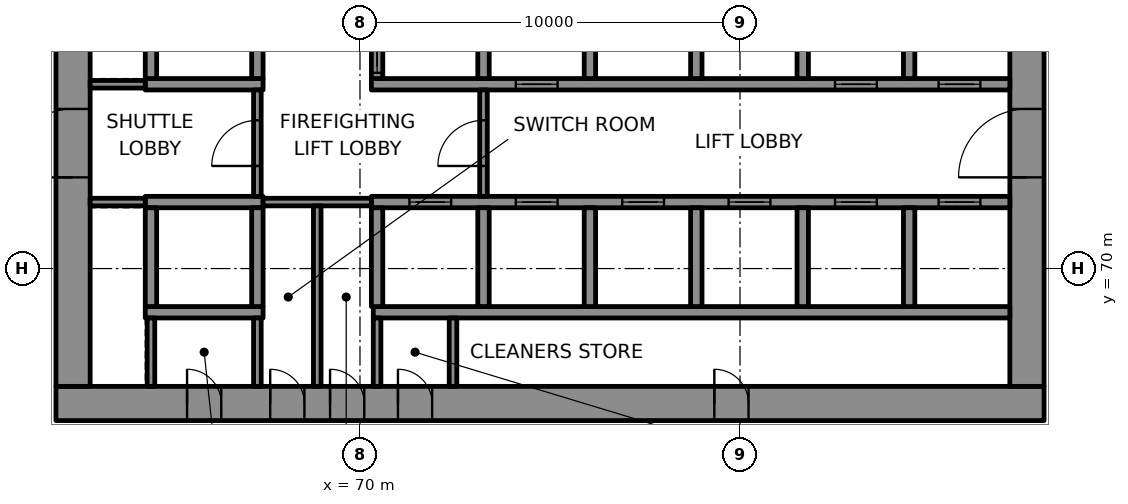
"""IFC4 building model, lengths in metres.
Left out: names, types, materials, properties, quantities, classifications, styles, units other than length and angle.
Written with IfcOpenShell. Run it as: python <this file> out.ifc"""

import sys

from ifc_helpers import new_model, si_unit, direction, frame, frame_2d, origin, place, context, subcontext, project, spatial, rectangle, extrude, element, fill, save


model = new_model("IFC4")
c1 = context("Model", 3, precision=1e-05, world=origin(), true_north=direction((0.0, 1.0)))
c2 = subcontext(c1, "Body", "Model", "MODEL_VIEW")
j1 = project(units=[si_unit("LENGTHUNIT", "METRE"), si_unit("PLANEANGLEUNIT", "RADIAN")], contexts=[c1])
p1 = place(None, origin())
s1 = spatial("IfcSite", under=j1, at=p1, CompositionType="ELEMENT")
p2 = place(p1, origin())
s2 = spatial("IfcBuilding", under=s1, at=p2, CompositionType="ELEMENT")
p3 = place(p2, frame((0.0, 0.0, 77.8)))
s3 = spatial("IfcBuildingStorey", under=s2, at=p3, CompositionType="ELEMENT", Elevation=77.8)
p4 = place(p3, frame((62.0, 66.45, 0.0), z_axis=(0.0, 0.0, 1.0), x_axis=(1.0, 0.0, 0.0)))
e1 = element("IfcWall", 1, at=p4, inside=s3, PredefinedType="SHEAR", context=c2, shape_type="SweptSolid", body=[
    extrude(rectangle(XDim=26.0, YDim=0.9, at=frame_2d((13.0, 0.0))), origin(), (0.0, 0.0, 1.0), 4.0),
])
p5 = place(p4, frame((3.45, 0.0, 0.0)))
e2 = element("IfcOpeningElement", 2, at=p5, cuts=e1, PredefinedType="OPENING", context=c2, shape_type="SweptSolid", body=[
    extrude(rectangle(XDim=0.9, YDim=2.1, at=frame_2d((0.45, 1.05))), frame((0.0, 0.46, 0.0), z_axis=(0.0, -1.0, 0.0), x_axis=(1.0, 0.0, 0.0)), (0.0, 0.0, 1.0), 0.92),
])
p6 = place(p4, frame((5.637, 0.0, 0.0)))
e3 = element("IfcOpeningElement", 3, at=p6, cuts=e1, PredefinedType="OPENING", context=c2, shape_type="SweptSolid", body=[
    extrude(rectangle(XDim=0.9, YDim=2.1, at=frame_2d((0.45, 1.05))), frame((0.0, 0.46, 0.0), z_axis=(0.0, -1.0, 0.0), x_axis=(1.0, 0.0, 0.0)), (0.0, 0.0, 1.0), 0.92),
])
p7 = place(p4, frame((7.212, 0.0, 0.0)))
e4 = element("IfcOpeningElement", 4, at=p7, cuts=e1, PredefinedType="OPENING", context=c2, shape_type="SweptSolid", body=[
    extrude(rectangle(XDim=0.9, YDim=2.1, at=frame_2d((0.45, 1.05))), frame((0.0, 0.46, 0.0), z_axis=(0.0, -1.0, 0.0), x_axis=(1.0, 0.0, 0.0)), (0.0, 0.0, 1.0), 0.92),
])
p8 = place(p4, frame((8.999, 0.0, 0.0)))
e5 = element("IfcOpeningElement", 5, at=p8, cuts=e1, PredefinedType="OPENING", context=c2, shape_type="SweptSolid", body=[
    extrude(rectangle(XDim=0.9, YDim=2.1, at=frame_2d((0.45, 1.05))), frame((0.0, 0.46, 0.0), z_axis=(0.0, -1.0, 0.0), x_axis=(1.0, 0.0, 0.0)), (0.0, 0.0, 1.0), 0.92),
])
p9 = place(p4, frame((17.324, 0.0, 0.0)))
e6 = element("IfcOpeningElement", 6, at=p9, cuts=e1, PredefinedType="OPENING", context=c2, shape_type="SweptSolid", body=[
    extrude(rectangle(XDim=0.9, YDim=2.1, at=frame_2d((0.45, 1.05))), frame((0.0, 0.46, 0.0), z_axis=(0.0, -1.0, 0.0), x_axis=(1.0, 0.0, 0.0)), (0.0, 0.0, 1.0), 0.92),
])
p10 = place(p3, frame((62.45, 66.9, 0.0), z_axis=(0.0, 0.0, 1.0), x_axis=(0.0, 1.0, 0.0)))
e7 = element("IfcWall", 7, at=p10, inside=s3, PredefinedType="SHEAR", context=c2, shape_type="SweptSolid", body=[
    extrude(rectangle(XDim=16.2, YDim=0.9, at=frame_2d((8.1, 0.0))), origin(), (0.0, 0.0, 1.0), 4.0),
])
p11 = place(p10, frame((5.5, 0.0, 0.0)))
e8 = element("IfcOpeningElement", 8, at=p11, cuts=e7, PredefinedType="OPENING", context=c2, shape_type="SweptSolid", body=[
    extrude(rectangle(XDim=1.8, YDim=2.1, at=frame_2d((0.9, 1.05))), frame((0.0, 0.46, 0.0), z_axis=(0.0, -1.0, 0.0), x_axis=(1.0, 0.0, 0.0)), (0.0, 0.0, 1.0), 0.92),
])
p12 = place(p3, frame((87.55, 66.9, 0.0), z_axis=(0.0, 0.0, 1.0), x_axis=(0.0, 1.0, 0.0)))
e9 = element("IfcWall", 9, at=p12, inside=s3, PredefinedType="SHEAR", context=c2, shape_type="SweptSolid", body=[
    extrude(rectangle(XDim=16.2, YDim=0.9, at=frame_2d((8.1, 0.0))), origin(), (0.0, 0.0, 1.0), 4.0),
])
p13 = place(p12, frame((5.5, 0.0, 0.0)))
e10 = element("IfcOpeningElement", 10, at=p13, cuts=e9, PredefinedType="OPENING", context=c2, shape_type="SweptSolid", body=[
    extrude(rectangle(XDim=1.8, YDim=2.1, at=frame_2d((0.9, 1.05))), frame((0.0, 0.46, 0.0), z_axis=(0.0, -1.0, 0.0), x_axis=(1.0, 0.0, 0.0)), (0.0, 0.0, 1.0), 0.92),
])
p14 = place(p12, frame((11.202, 0.0, 0.0)))
e11 = element("IfcOpeningElement", 11, at=p14, cuts=e9, PredefinedType="OPENING", context=c2, shape_type="SweptSolid", body=[
    extrude(rectangle(XDim=0.9, YDim=2.1, at=frame_2d((0.45, 1.05))), frame((0.0, 0.46, 0.0), z_axis=(0.0, -1.0, 0.0), x_axis=(1.0, 0.0, 0.0)), (0.0, 0.0, 1.0), 0.92),
])
p15 = place(p3, frame((64.35, 68.85, 0.0), z_axis=(0.0, 0.0, 1.0), x_axis=(1.0, 0.0, 0.0)))
e12 = element("IfcWall", 12, at=p15, inside=s3, PredefinedType="SHEAR", context=c2, shape_type="SweptSolid", body=[
    extrude(rectangle(XDim=3.1, YDim=0.3, at=frame_2d((1.55, 0.0))), origin(), (0.0, 0.0, 1.0), 4.0),
])
p16 = place(p3, frame((70.35, 68.85, 0.0), z_axis=(0.0, 0.0, 1.0), x_axis=(1.0, 0.0, 0.0)))
e13 = element("IfcWall", 13, at=p16, inside=s3, PredefinedType="SHEAR", context=c2, shape_type="SweptSolid", body=[
    extrude(rectangle(XDim=16.75, YDim=0.3, at=frame_2d((8.375, 0.0))), origin(), (0.0, 0.0, 1.0), 4.0),
])
p17 = place(p3, frame((64.35, 71.75, 0.0), z_axis=(0.0, 0.0, 1.0), x_axis=(1.0, 0.0, 0.0)))
e14 = element("IfcWall", 14, at=p17, inside=s3, PredefinedType="SHEAR", context=c2, shape_type="SweptSolid", body=[
    extrude(rectangle(XDim=3.1, YDim=0.3, at=frame_2d((1.55, 0.0))), origin(), (0.0, 0.0, 1.0), 4.0),
])
p18 = place(p3, frame((70.3, 71.75, 0.0), z_axis=(0.0, 0.0, 1.0), x_axis=(1.0, 0.0, 0.0)))
e15 = element("IfcWall", 15, at=p18, inside=s3, PredefinedType="SHEAR", context=c2, shape_type="SweptSolid", body=[
    extrude(rectangle(XDim=16.8, YDim=0.3, at=frame_2d((8.4, 0.0))), origin(), (0.0, 0.0, 1.0), 4.0),
])
p19 = place(p18, frame((1.0, 0.0, 0.0)))
e16 = element("IfcOpeningElement", 16, at=p19, cuts=e15, PredefinedType="OPENING", context=c2, shape_type="SweptSolid", body=[
    extrude(rectangle(XDim=1.1, YDim=2.1, at=frame_2d((0.55, 1.05))), frame((0.0, 0.16, 0.0), z_axis=(0.0, -1.0, 0.0), x_axis=(1.0, 0.0, 0.0)), (0.0, 0.0, 1.0), 0.32),
])
p20 = place(p18, frame((3.8, 0.0, 0.0)))
e17 = element("IfcOpeningElement", 17, at=p20, cuts=e15, PredefinedType="OPENING", context=c2, shape_type="SweptSolid", body=[
    extrude(rectangle(XDim=1.1, YDim=2.1, at=frame_2d((0.55, 1.05))), frame((0.0, 0.16, 0.0), z_axis=(0.0, -1.0, 0.0), x_axis=(1.0, 0.0, 0.0)), (0.0, 0.0, 1.0), 0.32),
])
p21 = place(p18, frame((6.6, 0.0, 0.0)))
e18 = element("IfcOpeningElement", 18, at=p21, cuts=e15, PredefinedType="OPENING", context=c2, shape_type="SweptSolid", body=[
    extrude(rectangle(XDim=1.1, YDim=2.1, at=frame_2d((0.55, 1.05))), frame((0.0, 0.16, 0.0), z_axis=(0.0, -1.0, 0.0), x_axis=(1.0, 0.0, 0.0)), (0.0, 0.0, 1.0), 0.32),
])
p22 = place(p18, frame((9.4, 0.0, 0.0)))
e19 = element("IfcOpeningElement", 19, at=p22, cuts=e15, PredefinedType="OPENING", context=c2, shape_type="SweptSolid", body=[
    extrude(rectangle(XDim=1.1, YDim=2.1, at=frame_2d((0.55, 1.05))), frame((0.0, 0.16, 0.0), z_axis=(0.0, -1.0, 0.0), x_axis=(1.0, 0.0, 0.0)), (0.0, 0.0, 1.0), 0.32),
])
p23 = place(p18, frame((12.2, 0.0, 0.0)))
e20 = element("IfcOpeningElement", 20, at=p23, cuts=e15, PredefinedType="OPENING", context=c2, shape_type="SweptSolid", body=[
    extrude(rectangle(XDim=1.1, YDim=2.1, at=frame_2d((0.55, 1.05))), frame((0.0, 0.16, 0.0), z_axis=(0.0, -1.0, 0.0), x_axis=(1.0, 0.0, 0.0)), (0.0, 0.0, 1.0), 0.32),
])
p24 = place(p18, frame((14.925, 0.0, 0.0)))
e21 = element("IfcOpeningElement", 21, at=p24, cuts=e15, PredefinedType="OPENING", context=c2, shape_type="SweptSolid", body=[
    extrude(rectangle(XDim=1.1, YDim=2.1, at=frame_2d((0.55, 1.05))), frame((0.0, 0.16, 0.0), z_axis=(0.0, -1.0, 0.0), x_axis=(1.0, 0.0, 0.0)), (0.0, 0.0, 1.0), 0.32),
])
p25 = place(p3, frame((64.35, 74.85, 0.0), z_axis=(0.0, 0.0, 1.0), x_axis=(1.0, 0.0, 0.0)))
e22 = element("IfcWall", 22, at=p25, inside=s3, PredefinedType="SHEAR", context=c2, shape_type="SweptSolid", body=[
    extrude(rectangle(XDim=3.1, YDim=0.3, at=frame_2d((1.55, 0.0))), origin(), (0.0, 0.0, 1.0), 4.0),
])
p26 = place(p3, frame((70.3, 74.85, 0.0), z_axis=(0.0, 0.0, 1.0), x_axis=(1.0, 0.0, 0.0)))
e23 = element("IfcWall", 23, at=p26, inside=s3, PredefinedType="SHEAR", context=c2, shape_type="SweptSolid", body=[
    extrude(rectangle(XDim=16.8, YDim=0.3, at=frame_2d((8.4, 0.0))), origin(), (0.0, 0.0, 1.0), 4.0),
])
p27 = place(p26, frame((3.8, 0.0, 0.0)))
e24 = element("IfcOpeningElement", 24, at=p27, cuts=e23, PredefinedType="OPENING", context=c2, shape_type="SweptSolid", body=[
    extrude(rectangle(XDim=1.1, YDim=2.1, at=frame_2d((0.55, 1.05))), frame((0.0, 0.16, 0.0), z_axis=(0.0, -1.0, 0.0), x_axis=(1.0, 0.0, 0.0)), (0.0, 0.0, 1.0), 0.32),
])
p28 = place(p26, frame((12.2, 0.0, 0.0)))
e25 = element("IfcOpeningElement", 25, at=p28, cuts=e23, PredefinedType="OPENING", context=c2, shape_type="SweptSolid", body=[
    extrude(rectangle(XDim=1.1, YDim=2.1, at=frame_2d((0.55, 1.05))), frame((0.0, 0.16, 0.0), z_axis=(0.0, -1.0, 0.0), x_axis=(1.0, 0.0, 0.0)), (0.0, 0.0, 1.0), 0.32),
])
p29 = place(p26, frame((14.925, 0.0, 0.0)))
e26 = element("IfcOpeningElement", 26, at=p29, cuts=e23, PredefinedType="OPENING", context=c2, shape_type="SweptSolid", body=[
    extrude(rectangle(XDim=1.1, YDim=2.1, at=frame_2d((0.55, 1.05))), frame((0.0, 0.16, 0.0), z_axis=(0.0, -1.0, 0.0), x_axis=(1.0, 0.0, 0.0)), (0.0, 0.0, 1.0), 0.32),
])
for number, where, z_axis, x_axis in (
    (27, (64.5, 69.0, 0.0), (0.0, 0.0, 1.0), (0.0, 1.0, 0.0)),
    (28, (64.5, 75.0, 0.0), (0.0, 0.0, 1.0), (0.0, 1.0, 0.0)),
    (29, (67.3, 69.0, 0.0), (0.0, 0.0, 1.0), (0.0, 1.0, 0.0)),
    (30, (67.3, 75.0, 0.0), (0.0, 0.0, 1.0), (0.0, 1.0, 0.0)),
    (31, (70.45, 69.0, 0.0), (0.0, 0.0, 1.0), (0.0, 1.0, 0.0)),
):
    element("IfcWall", number, at=place(p3, frame(where, z_axis=z_axis, x_axis=x_axis)), inside=s3, PredefinedType="SHEAR", context=c2, shape_type="SweptSolid", body=[
        extrude(rectangle(XDim=2.6, YDim=0.3, at=frame_2d((1.3, 0.0))), origin(), (0.0, 0.0, 1.0), 4.0),
    ])
p30 = place(p3, frame((70.45, 75.0, 0.0), z_axis=(0.0, 0.0, 1.0), x_axis=(0.0, 1.0, 0.0)))
e32 = element("IfcWall", 32, at=p30, inside=s3, PredefinedType="SHEAR", context=c2, shape_type="SweptSolid", body=[
    extrude(rectangle(XDim=2.6, YDim=0.3, at=frame_2d((1.3, 0.0))), origin(), (0.0, 0.0, 1.0), 4.0),
])
p31 = place(p30, frame((0.15, 0.0, 0.0)))
e33 = element("IfcOpeningElement", 33, at=p31, cuts=e32, PredefinedType="OPENING", context=c2, shape_type="SweptSolid", body=[
    extrude(rectangle(XDim=1.1, YDim=2.1, at=frame_2d((0.55, 1.05))), frame((0.0, 0.16, 0.0), z_axis=(0.0, -1.0, 0.0), x_axis=(1.0, 0.0, 0.0)), (0.0, 0.0, 1.0), 0.32),
])
for number, where, z_axis, x_axis in (
    (34, (73.25, 69.0, 0.0), (0.0, 0.0, 1.0), (0.0, 1.0, 0.0)),
    (35, (73.25, 75.0, 0.0), (0.0, 0.0, 1.0), (0.0, 1.0, 0.0)),
    (36, (76.05, 69.0, 0.0), (0.0, 0.0, 1.0), (0.0, 1.0, 0.0)),
    (37, (76.05, 75.0, 0.0), (0.0, 0.0, 1.0), (0.0, 1.0, 0.0)),
    (38, (78.85, 69.0, 0.0), (0.0, 0.0, 1.0), (0.0, 1.0, 0.0)),
    (39, (78.85, 75.0, 0.0), (0.0, 0.0, 1.0), (0.0, 1.0, 0.0)),
    (40, (81.65, 69.0, 0.0), (0.0, 0.0, 1.0), (0.0, 1.0, 0.0)),
    (41, (81.65, 75.0, 0.0), (0.0, 0.0, 1.0), (0.0, 1.0, 0.0)),
    (42, (84.45, 69.0, 0.0), (0.0, 0.0, 1.0), (0.0, 1.0, 0.0)),
    (43, (84.45, 75.0, 0.0), (0.0, 0.0, 1.0), (0.0, 1.0, 0.0)),
):
    element("IfcWall", number, at=place(p3, frame(where, z_axis=z_axis, x_axis=x_axis)), inside=s3, PredefinedType="SHEAR", context=c2, shape_type="SweptSolid", body=[
        extrude(rectangle(XDim=2.6, YDim=0.3, at=frame_2d((1.3, 0.0))), origin(), (0.0, 0.0, 1.0), 4.0),
    ])
p32 = place(p3, frame((62.9, 71.75, 0.0), z_axis=(0.0, 0.0, 1.0), x_axis=(1.0, 0.0, 0.0)))
e44 = element("IfcWall", 44, at=p32, inside=s3, PredefinedType="PARTITIONING", context=c2, shape_type="SweptSolid", body=[
    extrude(rectangle(XDim=1.45, YDim=0.2, at=frame_2d((0.725, 0.0))), origin(), (0.0, 0.0, 1.0), 4.0),
])
p33 = place(p3, frame((67.45, 71.75, 0.0), z_axis=(0.0, 0.0, 1.0), x_axis=(1.0, 0.0, 0.0)))
e45 = element("IfcWall", 45, at=p33, inside=s3, PredefinedType="PARTITIONING", context=c2, shape_type="SweptSolid", body=[
    extrude(rectangle(XDim=2.85, YDim=0.2, at=frame_2d((1.425, 0.0))), origin(), (0.0, 0.0, 1.0), 4.0),
])
p34 = place(p3, frame((62.9, 74.85, 0.0), z_axis=(0.0, 0.0, 1.0), x_axis=(1.0, 0.0, 0.0)))
e46 = element("IfcWall", 46, at=p34, inside=s3, PredefinedType="PARTITIONING", context=c2, shape_type="SweptSolid", body=[
    extrude(rectangle(XDim=1.45, YDim=0.2, at=frame_2d((0.725, 0.0))), origin(), (0.0, 0.0, 1.0), 4.0),
])
for number, where, z_axis, x_axis in (
    (47, (64.5, 66.9, 0.0), (0.0, 0.0, 1.0), (0.0, 1.0, 0.0)),
    (48, (67.3, 66.9, 0.0), (0.0, 0.0, 1.0), (0.0, 1.0, 0.0)),
):
    element("IfcWall", number, at=place(p3, frame(where, z_axis=z_axis, x_axis=x_axis)), inside=s3, PredefinedType="PARTITIONING", context=c2, shape_type="SweptSolid", body=[
        extrude(rectangle(XDim=1.8, YDim=0.2, at=frame_2d((0.9, 0.0))), origin(), (0.0, 0.0, 1.0), 4.0),
    ])
p35 = place(p3, frame((67.3, 71.9, 0.0), z_axis=(0.0, 0.0, 1.0), x_axis=(0.0, 1.0, 0.0)))
e49 = element("IfcWall", 49, at=p35, inside=s3, PredefinedType="PARTITIONING", context=c2, shape_type="SweptSolid", body=[
    extrude(rectangle(XDim=2.8, YDim=0.2, at=frame_2d((1.4, 0.0))), origin(), (0.0, 0.0, 1.0), 4.0),
])
p36 = place(p35, frame((0.8, 0.0, 0.0)))
e50 = element("IfcOpeningElement", 50, at=p36, cuts=e49, PredefinedType="OPENING", context=c2, shape_type="SweptSolid", body=[
    extrude(rectangle(XDim=1.2, YDim=2.1, at=frame_2d((0.6, 1.05))), frame((0.0, 0.11, 0.0), z_axis=(0.0, -1.0, 0.0), x_axis=(1.0, 0.0, 0.0)), (0.0, 0.0, 1.0), 0.22),
])
p37 = place(p3, frame((68.875, 66.9, 0.0), z_axis=(0.0, 0.0, 1.0), x_axis=(0.0, 1.0, 0.0)))
e51 = element("IfcWall", 51, at=p37, inside=s3, PredefinedType="PARTITIONING", context=c2, shape_type="SweptSolid", body=[
    extrude(rectangle(XDim=4.75, YDim=0.2, at=frame_2d((2.375, 0.0))), origin(), (0.0, 0.0, 1.0), 4.0),
])
for number, where, z_axis, x_axis in (
    (52, (70.45, 66.9, 0.0), (0.0, 0.0, 1.0), (0.0, 1.0, 0.0)),
    (53, (72.448, 66.9, 0.0), (0.0, 0.0, 1.0), (0.0, 1.0, 0.0)),
):
    element("IfcWall", number, at=place(p3, frame(where, z_axis=z_axis, x_axis=x_axis)), inside=s3, PredefinedType="PARTITIONING", context=c2, shape_type="SweptSolid", body=[
        extrude(rectangle(XDim=1.8, YDim=0.2, at=frame_2d((0.9, 0.0))), origin(), (0.0, 0.0, 1.0), 4.0),
    ])
p38 = place(p3, frame((73.25, 71.9, 0.0), z_axis=(0.0, 0.0, 1.0), x_axis=(0.0, 1.0, 0.0)))
e54 = element("IfcWall", 54, at=p38, inside=s3, PredefinedType="PARTITIONING", context=c2, shape_type="SweptSolid", body=[
    extrude(rectangle(XDim=2.8, YDim=0.2, at=frame_2d((1.4, 0.0))), origin(), (0.0, 0.0, 1.0), 4.0),
])
p39 = place(p38, frame((0.8, 0.0, 0.0)))
e55 = element("IfcOpeningElement", 55, at=p39, cuts=e54, PredefinedType="OPENING", context=c2, shape_type="SweptSolid", body=[
    extrude(rectangle(XDim=1.2, YDim=2.1, at=frame_2d((0.6, 1.05))), frame((0.0, 0.11, 0.0), z_axis=(0.0, -1.0, 0.0), x_axis=(1.0, 0.0, 0.0)), (0.0, 0.0, 1.0), 0.22),
])
p40 = place(p19, origin())
e56 = element("IfcDoor", 56, at=p40, inside=s3, OperationType="DOUBLE_DOOR_SLIDING", PredefinedType="DOOR", context=c2, shape_type="SweptSolid", body=[
    extrude(rectangle(XDim=1.1, YDim=2.1, at=frame_2d((0.55, 1.05))), frame((0.0, 0.025, 0.0), z_axis=(0.0, -1.0, 0.0), x_axis=(1.0, 0.0, 0.0)), (0.0, 0.0, 1.0), 0.05),
])
fill(e16, e56)
p41 = place(p20, origin())
e57 = element("IfcDoor", 57, at=p41, inside=s3, OperationType="DOUBLE_DOOR_SLIDING", PredefinedType="DOOR", context=c2, shape_type="SweptSolid", body=[
    extrude(rectangle(XDim=1.1, YDim=2.1, at=frame_2d((0.55, 1.05))), frame((0.0, 0.025, 0.0), z_axis=(0.0, -1.0, 0.0), x_axis=(1.0, 0.0, 0.0)), (0.0, 0.0, 1.0), 0.05),
])
fill(e17, e57)
p42 = place(p21, origin())
e58 = element("IfcDoor", 58, at=p42, inside=s3, OperationType="DOUBLE_DOOR_SLIDING", PredefinedType="DOOR", context=c2, shape_type="SweptSolid", body=[
    extrude(rectangle(XDim=1.1, YDim=2.1, at=frame_2d((0.55, 1.05))), frame((0.0, 0.025, 0.0), z_axis=(0.0, -1.0, 0.0), x_axis=(1.0, 0.0, 0.0)), (0.0, 0.0, 1.0), 0.05),
])
fill(e18, e58)
p43 = place(p22, origin())
e59 = element("IfcDoor", 59, at=p43, inside=s3, OperationType="DOUBLE_DOOR_SLIDING", PredefinedType="DOOR", context=c2, shape_type="SweptSolid", body=[
    extrude(rectangle(XDim=1.1, YDim=2.1, at=frame_2d((0.55, 1.05))), frame((0.0, 0.025, 0.0), z_axis=(0.0, -1.0, 0.0), x_axis=(1.0, 0.0, 0.0)), (0.0, 0.0, 1.0), 0.05),
])
fill(e19, e59)
p44 = place(p23, origin())
e60 = element("IfcDoor", 60, at=p44, inside=s3, OperationType="DOUBLE_DOOR_SLIDING", PredefinedType="DOOR", context=c2, shape_type="SweptSolid", body=[
    extrude(rectangle(XDim=1.1, YDim=2.1, at=frame_2d((0.55, 1.05))), frame((0.0, 0.025, 0.0), z_axis=(0.0, -1.0, 0.0), x_axis=(1.0, 0.0, 0.0)), (0.0, 0.0, 1.0), 0.05),
])
fill(e20, e60)
p45 = place(p24, origin())
e61 = element("IfcDoor", 61, at=p45, inside=s3, OperationType="DOUBLE_DOOR_SLIDING", PredefinedType="DOOR", context=c2, shape_type="SweptSolid", body=[
    extrude(rectangle(XDim=1.1, YDim=2.1, at=frame_2d((0.55, 1.05))), frame((0.0, 0.025, 0.0), z_axis=(0.0, -1.0, 0.0), x_axis=(1.0, 0.0, 0.0)), (0.0, 0.0, 1.0), 0.05),
])
fill(e21, e61)
p46 = place(p31, origin())
e62 = element("IfcDoor", 62, at=p46, inside=s3, OperationType="DOUBLE_DOOR_SLIDING", PredefinedType="DOOR", context=c2, shape_type="SweptSolid", body=[
    extrude(rectangle(XDim=1.1, YDim=2.1, at=frame_2d((0.55, 1.05))), frame((0.0, 0.025, 0.0), z_axis=(0.0, -1.0, 0.0), x_axis=(1.0, 0.0, 0.0)), (0.0, 0.0, 1.0), 0.05),
])
fill(e33, e62)
p47 = place(p27, origin())
e63 = element("IfcDoor", 63, at=p47, inside=s3, OperationType="DOUBLE_DOOR_SLIDING", PredefinedType="DOOR", context=c2, shape_type="SweptSolid", body=[
    extrude(rectangle(XDim=1.1, YDim=2.1, at=frame_2d((0.55, 1.05))), frame((0.0, 0.025, 0.0), z_axis=(0.0, -1.0, 0.0), x_axis=(1.0, 0.0, 0.0)), (0.0, 0.0, 1.0), 0.05),
])
fill(e24, e63)
p48 = place(p28, origin())
e64 = element("IfcDoor", 64, at=p48, inside=s3, OperationType="DOUBLE_DOOR_SLIDING", PredefinedType="DOOR", context=c2, shape_type="SweptSolid", body=[
    extrude(rectangle(XDim=1.1, YDim=2.1, at=frame_2d((0.55, 1.05))), frame((0.0, 0.025, 0.0), z_axis=(0.0, -1.0, 0.0), x_axis=(1.0, 0.0, 0.0)), (0.0, 0.0, 1.0), 0.05),
])
fill(e25, e64)
p49 = place(p29, origin())
e65 = element("IfcDoor", 65, at=p49, inside=s3, OperationType="DOUBLE_DOOR_SLIDING", PredefinedType="DOOR", context=c2, shape_type="SweptSolid", body=[
    extrude(rectangle(XDim=1.1, YDim=2.1, at=frame_2d((0.55, 1.05))), frame((0.0, 0.025, 0.0), z_axis=(0.0, -1.0, 0.0), x_axis=(1.0, 0.0, 0.0)), (0.0, 0.0, 1.0), 0.05),
])
fill(e26, e65)
p50 = place(p39, origin())
e66 = element("IfcDoor", 66, at=p50, inside=s3, OperationType="SINGLE_SWING_LEFT", PredefinedType="DOOR", context=c2, shape_type="SweptSolid", body=[
    extrude(rectangle(XDim=1.2, YDim=2.1, at=frame_2d((0.6, 1.05))), frame((0.0, 0.025, 0.0), z_axis=(0.0, -1.0, 0.0), x_axis=(1.0, 0.0, 0.0)), (0.0, 0.0, 1.0), 0.05),
])
fill(e55, e66)
p51 = place(p36, origin())
e67 = element("IfcDoor", 67, at=p51, inside=s3, OperationType="SINGLE_SWING_RIGHT", PredefinedType="DOOR", context=c2, shape_type="SweptSolid", body=[
    extrude(rectangle(XDim=1.2, YDim=2.1, at=frame_2d((0.6, 1.05))), frame((0.0, 0.025, 0.0), z_axis=(0.0, -1.0, 0.0), x_axis=(1.0, 0.0, 0.0)), (0.0, 0.0, 1.0), 0.05),
])
fill(e50, e67)
p52 = place(p11, origin())
e68 = element("IfcDoor", 68, at=p52, inside=s3, OperationType="SINGLE_SWING_LEFT", PredefinedType="DOOR", context=c2, shape_type="SweptSolid", body=[
    extrude(rectangle(XDim=1.8, YDim=2.1, at=frame_2d((0.9, 1.05))), frame((0.0, 0.17, 0.0), z_axis=(0.0, -1.0, 0.0), x_axis=(1.0, 0.0, 0.0)), (0.0, 0.0, 1.0), 0.34),
])
fill(e8, e68)
p53 = place(p13, origin())
e69 = element("IfcDoor", 69, at=p53, inside=s3, OperationType="SINGLE_SWING_RIGHT", PredefinedType="DOOR", context=c2, shape_type="SweptSolid", body=[
    extrude(rectangle(XDim=1.8, YDim=2.1, at=frame_2d((0.9, 1.05))), frame((0.0, 0.17, 0.0), z_axis=(0.0, -1.0, 0.0), x_axis=(1.0, 0.0, 0.0)), (0.0, 0.0, 1.0), 0.34),
])
fill(e10, e69)
p54 = place(p5, origin())
e70 = element("IfcDoor", 70, at=p54, inside=s3, OperationType="SINGLE_SWING_LEFT", PredefinedType="DOOR", context=c2, shape_type="SweptSolid", body=[
    extrude(rectangle(XDim=0.9, YDim=2.1, at=frame_2d((0.45, 1.05))), frame((0.0, 0.17, 0.0), z_axis=(0.0, -1.0, 0.0), x_axis=(1.0, 0.0, 0.0)), (0.0, 0.0, 1.0), 0.34),
])
fill(e2, e70)
p55 = place(p6, origin())
e71 = element("IfcDoor", 71, at=p55, inside=s3, OperationType="SINGLE_SWING_RIGHT", PredefinedType="DOOR", context=c2, shape_type="SweptSolid", body=[
    extrude(rectangle(XDim=0.9, YDim=2.1, at=frame_2d((0.45, 1.05))), frame((0.0, 0.17, 0.0), z_axis=(0.0, -1.0, 0.0), x_axis=(1.0, 0.0, 0.0)), (0.0, 0.0, 1.0), 0.34),
])
fill(e3, e71)
p56 = place(p7, origin())
e72 = element("IfcDoor", 72, at=p56, inside=s3, OperationType="SINGLE_SWING_LEFT", PredefinedType="DOOR", context=c2, shape_type="SweptSolid", body=[
    extrude(rectangle(XDim=0.9, YDim=2.1, at=frame_2d((0.45, 1.05))), frame((0.0, 0.17, 0.0), z_axis=(0.0, -1.0, 0.0), x_axis=(1.0, 0.0, 0.0)), (0.0, 0.0, 1.0), 0.34),
])
fill(e4, e72)
p57 = place(p8, origin())
e73 = element("IfcDoor", 73, at=p57, inside=s3, OperationType="SINGLE_SWING_RIGHT", PredefinedType="DOOR", context=c2, shape_type="SweptSolid", body=[
    extrude(rectangle(XDim=0.9, YDim=2.1, at=frame_2d((0.45, 1.05))), frame((0.0, 0.17, 0.0), z_axis=(0.0, -1.0, 0.0), x_axis=(1.0, 0.0, 0.0)), (0.0, 0.0, 1.0), 0.34),
])
fill(e5, e73)
p58 = place(p9, origin())
e74 = element("IfcDoor", 74, at=p58, inside=s3, OperationType="SINGLE_SWING_LEFT", PredefinedType="DOOR", context=c2, shape_type="SweptSolid", body=[
    extrude(rectangle(XDim=0.9, YDim=2.1, at=frame_2d((0.45, 1.05))), frame((0.0, 0.17, 0.0), z_axis=(0.0, -1.0, 0.0), x_axis=(1.0, 0.0, 0.0)), (0.0, 0.0, 1.0), 0.34),
])
fill(e6, e74)
save(model, sys.argv[1])
